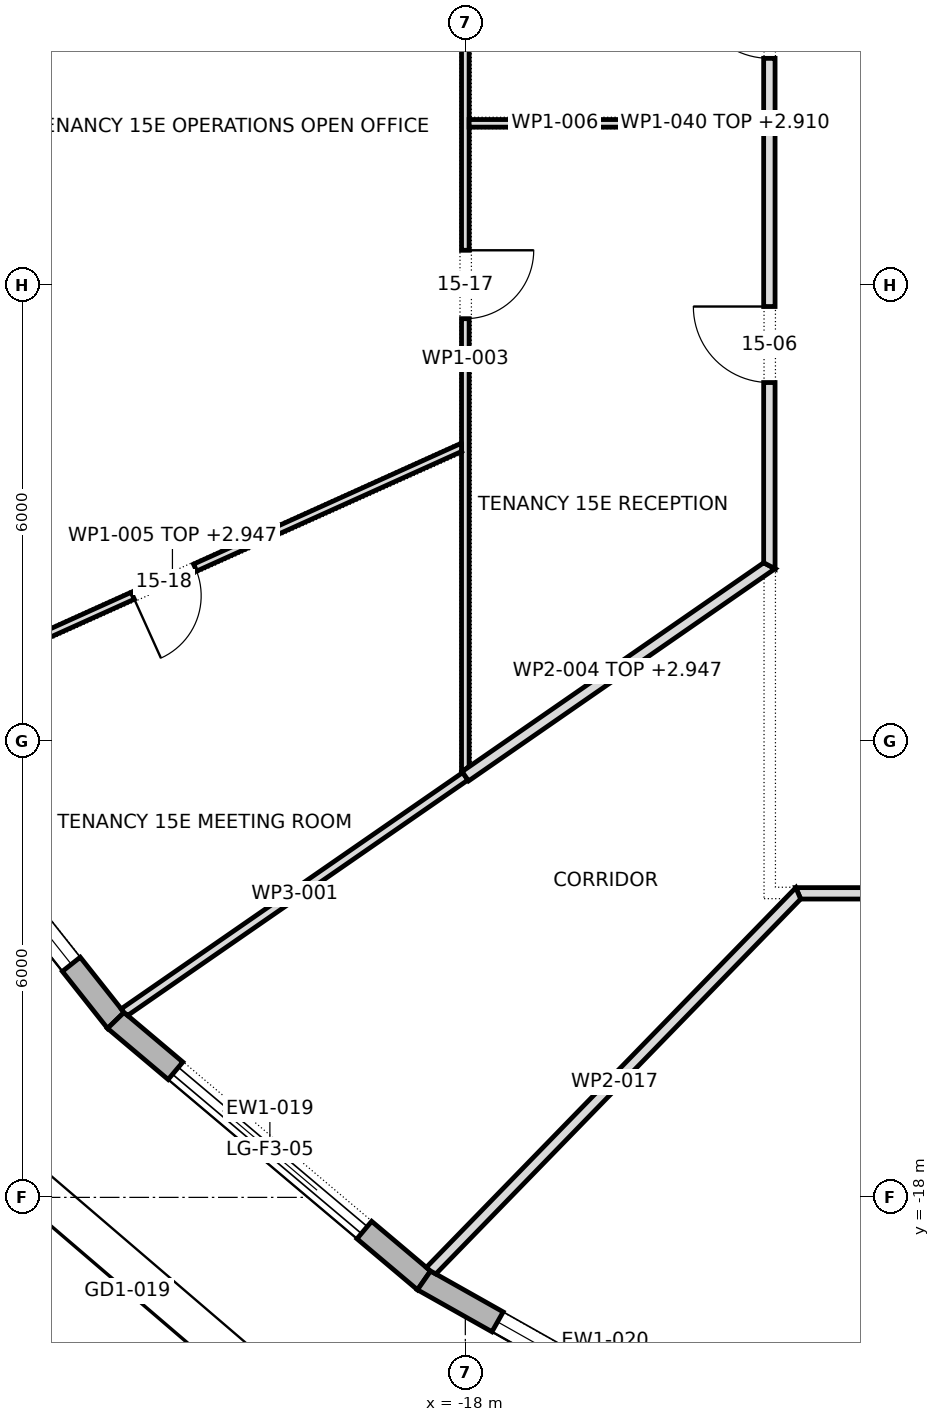
"""IFC4 building model, lengths in metres.
Left out: names, types, materials, properties, quantities, classifications, styles, units other than length and angle.
Written with IfcOpenShell. Run it as: python <this file> out.ifc"""

import sys

from ifc_helpers import new_model, si_unit, direction, frame, frame_2d, origin, place, context, subcontext, project, spatial, polyline, rectangle, outline, extrude, element, fill, save


model = new_model("IFC4")
c1 = context("Model", 3, precision=1e-05, world=origin(), true_north=direction((0.0, 1.0)))
c2 = subcontext(c1, "Body", "Model", "MODEL_VIEW")
j1 = project(units=[si_unit("LENGTHUNIT", "METRE"), si_unit("PLANEANGLEUNIT", "RADIAN")], contexts=[c1])
p1 = place(None, origin())
s1 = spatial("IfcSite", under=j1, at=p1, CompositionType="ELEMENT")
p2 = place(p1, origin())
s2 = spatial("IfcBuilding", under=s1, at=p2, CompositionType="ELEMENT")
p3 = place(p2, frame((0.0, 0.0, 214.9)))
s3 = spatial("IfcBuildingStorey", under=s2, at=p3, CompositionType="ELEMENT", Elevation=214.9)
p4 = place(p3, frame((-25.787, -11.648, 0.0), z_axis=(0.0, 0.0, 1.0), x_axis=(0.621017151557, -0.783796974651, 0.0)))
e1 = element("IfcWall", 1, at=p4, inside=s3, PredefinedType="STANDARD", context=c2, shape_type="SweptSolid", body=[
    extrude(outline(polyline([(-0.016, -0.15), (5.149, -0.15), (5.119, 0.15), (0.016, 0.15), (-0.016, -0.15)])), origin(), (0.0, 0.0, 1.0), 3.7),
])
p5 = place(p4, frame((0.942, 0.0, 0.6)))
e2 = element("IfcOpeningElement", 2, at=p5, cuts=e1, PredefinedType="OPENING", context=c2, shape_type="SweptSolid", body=[
    extrude(rectangle(XDim=3.25, YDim=2.65, at=frame_2d((1.625, 1.325))), frame((0.0, 0.162, 0.0), z_axis=(0.0, -1.0, 0.0), x_axis=(1.0, 0.0, 0.0)), (0.0, 0.0, 1.0), 0.324),
])
p6 = place(p3, frame((-22.599, -15.672, 0.0), z_axis=(0.0, 0.0, 1.0), x_axis=(0.764397795062, -0.644744919255, 0.0)))
e3 = element("IfcWall", 3, at=p6, inside=s3, PredefinedType="STANDARD", context=c2, shape_type="SweptSolid", body=[
    extrude(outline(polyline([(-0.015, -0.15), (5.319, -0.15), (5.291, 0.15), (0.015, 0.15), (-0.015, -0.15)])), origin(), (0.0, 0.0, 1.0), 3.7),
])
p7 = place(p6, frame((1.028, 0.0, 0.0)))
e4 = element("IfcOpeningElement", 4, at=p7, cuts=e3, PredefinedType="OPENING", context=c2, shape_type="SweptSolid", body=[
    extrude(rectangle(XDim=3.25, YDim=3.25, at=frame_2d((1.625, 1.625))), frame((0.0, 0.162, 0.0), z_axis=(0.0, -1.0, 0.0), x_axis=(1.0, 0.0, 0.0)), (0.0, 0.0, 1.0), 0.324),
])
p8 = place(p3, frame((-18.543, -19.092, 0.0), z_axis=(0.0, 0.0, 1.0), x_axis=(0.871207038577, -0.490915772749, 0.0)))
e5 = element("IfcWall", 5, at=p8, inside=s3, PredefinedType="STANDARD", context=c2, shape_type="SweptSolid", body=[
    extrude(outline(polyline([(-0.014, -0.15), (5.484, -0.15), (5.458, 0.15), (0.014, 0.15), (-0.014, -0.15)])), origin(), (0.0, 0.0, 1.0), 3.7),
])
p9 = place(p8, frame((1.111, 0.0, 0.6)))
e6 = element("IfcOpeningElement", 6, at=p9, cuts=e5, PredefinedType="OPENING", context=c2, shape_type="SweptSolid", body=[
    extrude(rectangle(XDim=3.25, YDim=2.65, at=frame_2d((1.625, 1.325))), frame((0.0, 0.162, 0.0), z_axis=(0.0, -1.0, 0.0), x_axis=(1.0, 0.0, 0.0)), (0.0, 0.0, 1.0), 0.324),
])
p10 = place(p3, frame((-22.493, -15.569, 0.0), z_axis=(0.0, 0.0, 1.0), x_axis=(0.822322462014, 0.569021764494, 0.0)))
e7 = element("IfcWall", 7, at=p10, inside=s3, PredefinedType="PARTITIONING", context=c2, shape_type="SweptSolid", body=[
    extrude(outline(polyline([(0.02, -0.06), (1.834, -0.06), (3.649, -0.06), (5.464, -0.06), (5.464, 0.06), (3.643, 0.06), (1.821, 0.06), (0.0, 0.06), (0.0, 0.053), (0.003, 0.0), (0.02, -0.06)])), origin(), (0.0, 0.0, 1.0), 3.7),
])
p11 = place(p3, frame((-18.0, -12.421, 0.0), z_axis=(0.0, 0.0, 1.0), x_axis=(0.0, 1.0, 0.0)))
e8 = element("IfcWall", 8, at=p11, inside=s3, PredefinedType="PARTITIONING", context=c2, shape_type="SweptSolid", body=[
    extrude(outline(polyline([(0.087, -0.05), (1.77, -0.05), (3.453, -0.05), (5.136, -0.05), (6.819, -0.05), (8.501, -0.05), (8.501, -0.05), (8.601, -0.05), (8.601, -0.05), (10.842, -0.05), (10.842, 0.046), (10.842, 0.05), (9.191, 0.05), (7.541, 0.05), (5.89, 0.05), (4.24, 0.05), (4.235, 0.048), (4.234, 0.05), (2.823, 0.05), (1.411, 0.05), (0.0, 0.05), (0.0, 0.05), (0.011, 0.034), (0.023, 0.043), (0.087, -0.05)])), origin(), (0.0, 0.0, 1.0), 3.7),
])
p12 = place(p11, frame((5.981, 0.0, 0.0)))
e9 = element("IfcOpeningElement", 9, at=p12, cuts=e8, PredefinedType="OPENING", context=c2, shape_type="SweptSolid", body=[
    extrude(rectangle(XDim=0.9, YDim=2.1, at=frame_2d((0.45, 1.05))), frame((0.0, 0.062, 0.0), z_axis=(0.0, -1.0, 0.0), x_axis=(1.0, 0.0, 0.0)), (0.0, 0.0, 1.0), 0.124),
])
p13 = place(p3, frame((-18.0, -12.46, 0.0), z_axis=(0.0, 0.0, 1.0), x_axis=(0.822102584422, 0.56933938972, 0.0)))
e10 = element("IfcWall", 10, at=p13, inside=s3, PredefinedType="PARTITIONING", context=c2, shape_type="SweptSolid", body=[
    extrude(outline(polyline([(0.0, -0.075), (1.635, -0.075), (3.27, -0.075), (4.905, -0.075), (4.826, 0.075), (3.217, 0.075), (1.609, 0.075), (0.0, 0.075), (0.0, -0.075)])), origin(), (0.0, 0.0, 1.0), 2.947),
])
p14 = place(p3, frame((-18.03, -8.123, 0.0), z_axis=(0.0, 0.0, 1.0), x_axis=(-0.911431984772, -0.411450771216, 0.0)))
e11 = element("IfcWall", 11, at=p14, inside=s3, PredefinedType="PARTITIONING", context=c2, shape_type="SweptSolid", body=[
    extrude(outline(polyline([(8.372, -0.05), (8.372, -0.042), (8.371, -0.0), (8.358, 0.05), (6.696, 0.05), (5.033, 0.05), (3.37, 0.05), (1.708, 0.05), (0.045, 0.05), (0.0, -0.05), (0.0, -0.05), (1.675, -0.05), (3.349, -0.05), (5.023, -0.05), (6.698, -0.05), (8.372, -0.05)])), origin(), (0.0, 0.0, 1.0), 2.947),
])
p15 = place(p14, frame((3.868, 0.0, 0.0)))
e12 = element("IfcOpeningElement", 12, at=p15, cuts=e11, PredefinedType="OPENING", context=c2, shape_type="SweptSolid", body=[
    extrude(rectangle(XDim=0.9, YDim=2.1, at=frame_2d((0.45, 1.05))), frame((0.0, 0.062, 0.0), z_axis=(0.0, -1.0, 0.0), x_axis=(1.0, 0.0, 0.0)), (0.0, 0.0, 1.0), 0.124),
])
p16 = place(p3, frame((-17.95, -3.87, 0.0), z_axis=(0.0, 0.0, 1.0), x_axis=(1.0, 0.0, 0.0)))
e13 = element("IfcWall", 13, at=p16, inside=s3, PredefinedType="PARTITIONING", context=c2, shape_type="SweptSolid", body=[
    extrude(rectangle(XDim=2.258, YDim=0.1, at=frame_2d((1.129, 0.0))), origin(), (0.0, 0.0, 1.0), 3.7),
])
p17 = place(p3, frame((-13.652, -14.0, 0.0), z_axis=(0.0, 0.0, 1.0), x_axis=(1.0, 0.0, 0.0)))
e14 = element("IfcWall", 14, at=p17, inside=s3, PredefinedType="PARTITIONING", context=c2, shape_type="SweptSolid", body=[
    extrude(outline(polyline([(0.063, -0.075), (2.004, -0.075), (3.946, -0.075), (5.887, -0.075), (7.828, -0.075), (9.769, -0.075), (11.71, -0.075), (13.652, -0.075), (15.593, -0.075), (17.534, -0.075), (19.475, -0.075), (21.417, -0.075), (23.358, -0.075), (25.299, -0.075), (27.24, -0.075), (27.303, 0.075), (27.303, 0.075), (25.353, 0.075), (23.403, 0.075), (21.453, 0.075), (19.502, 0.075), (17.552, 0.075), (15.602, 0.075), (13.652, 0.075), (11.701, 0.075), (9.751, 0.075), (7.801, 0.075), (5.851, 0.075), (3.9, 0.075), (1.95, 0.075), (0.0, 0.075), (0.0, 0.075), (0.063, -0.075)])), origin(), (0.0, 0.0, 1.0), 3.7),
])
p18 = place(p17, frame((5.527, 0.0, 0.0)))
e15 = element("IfcOpeningElement", 15, at=p18, cuts=e14, PredefinedType="OPENING", context=c2, shape_type="SweptSolid", body=[
    extrude(rectangle(XDim=1.0, YDim=2.1, at=frame_2d((0.5, 1.05))), frame((0.0, 0.087, 0.0), z_axis=(0.0, -1.0, 0.0), x_axis=(1.0, 0.0, 0.0)), (0.0, 0.0, 1.0), 0.174),
])
p19 = place(p17, frame((14.857, 0.0, 0.0)))
e16 = element("IfcOpeningElement", 16, at=p19, cuts=e14, PredefinedType="OPENING", context=c2, shape_type="SweptSolid", body=[
    extrude(rectangle(XDim=1.0, YDim=2.1, at=frame_2d((0.5, 1.05))), frame((0.0, 0.087, 0.0), z_axis=(0.0, -1.0, 0.0), x_axis=(1.0, 0.0, 0.0)), (0.0, 0.0, 1.0), 0.174),
])
p20 = place(p17, frame((22.482, 0.0, 0.0)))
e17 = element("IfcOpeningElement", 17, at=p20, cuts=e14, PredefinedType="OPENING", context=c2, shape_type="SweptSolid", body=[
    extrude(rectangle(XDim=1.0, YDim=2.1, at=frame_2d((0.5, 1.05))), frame((0.0, 0.087, 0.0), z_axis=(0.0, -1.0, 0.0), x_axis=(1.0, 0.0, 0.0)), (0.0, 0.0, 1.0), 0.174),
])
p21 = place(p3, frame((-14.0, -9.729, 0.0), z_axis=(0.0, 0.0, 1.0), x_axis=(0.0, 1.0, 0.0)))
e18 = element("IfcWall", 18, at=p21, inside=s3, PredefinedType="PARTITIONING", context=c2, shape_type="SweptSolid", body=[
    extrude(outline(polyline([(15.589, 0.075), (13.65, 0.075), (11.712, 0.075), (9.773, 0.075), (7.834, 0.075), (5.895, 0.075), (3.956, 0.075), (2.017, 0.075), (0.079, 0.075), (0.0, -0.075), (0.0, -0.075), (1.949, -0.075), (3.897, -0.075), (5.846, -0.075), (7.795, -0.075), (9.743, -0.075), (11.692, -0.075), (13.641, -0.075), (15.589, -0.075), (15.589, 0.075)])), origin(), (0.0, 0.0, 1.0), 3.7),
])
p22 = place(p21, frame((11.579, 0.0, 0.0)))
e19 = element("IfcOpeningElement", 19, at=p22, cuts=e18, PredefinedType="OPENING", context=c2, shape_type="SweptSolid", body=[
    extrude(rectangle(XDim=1.0, YDim=2.1, at=frame_2d((0.5, 1.05))), frame((0.0, 0.087, 0.0), z_axis=(0.0, -1.0, 0.0), x_axis=(1.0, 0.0, 0.0)), (0.0, 0.0, 1.0), 0.174),
])
p23 = place(p21, frame((2.449, 0.0, 0.0)))
e20 = element("IfcOpeningElement", 20, at=p23, cuts=e18, PredefinedType="OPENING", context=c2, shape_type="SweptSolid", body=[
    extrude(rectangle(XDim=1.0, YDim=2.1, at=frame_2d((0.5, 1.05))), frame((0.0, 0.087, 0.0), z_axis=(0.0, -1.0, 0.0), x_axis=(1.0, 0.0, 0.0)), (0.0, 0.0, 1.0), 0.174),
])
p24 = place(p21, frame((6.714, 0.0, 0.0)))
e21 = element("IfcOpeningElement", 21, at=p24, cuts=e18, PredefinedType="OPENING", context=c2, shape_type="SweptSolid", body=[
    extrude(rectangle(XDim=1.0, YDim=2.1, at=frame_2d((0.5, 1.05))), frame((0.0, 0.087, 0.0), z_axis=(0.0, -1.0, 0.0), x_axis=(1.0, 0.0, 0.0)), (0.0, 0.0, 1.0), 0.174),
])
p25 = place(p3, frame((-13.598, -13.977, 0.0), z_axis=(0.0, 0.0, 1.0), x_axis=(-0.697374409368, -0.716707006494, 0.0)))
e22 = element("IfcWall", 22, at=p25, inside=s3, PredefinedType="PARTITIONING", context=c2, shape_type="SweptSolid", body=[
    extrude(outline(polyline([(6.971, -0.075), (6.971, -0.07), (6.966, -0.002), (6.946, 0.075), (5.225, 0.075), (3.505, 0.075), (1.784, 0.075), (0.063, 0.075), (0.032, 0.0), (0.0, -0.075), (1.743, -0.075), (3.486, -0.075), (5.228, -0.075), (6.971, -0.075)])), origin(), (0.0, 0.0, 1.0), 3.7),
])
p26 = place(p3, frame((-15.692, -3.87, 0.0), z_axis=(0.0, 0.0, 1.0), x_axis=(1.0, 0.0, 0.0)))
e23 = element("IfcWall", 23, at=p26, inside=s3, PredefinedType="PARTITIONING", context=c2, shape_type="SweptSolid", body=[
    extrude(rectangle(XDim=1.617, YDim=0.1, at=frame_2d((0.809, 0.0))), origin(), (0.0, 0.0, 1.0), 2.91),
])
p27 = place(p5, origin())
e24 = element("IfcWindow", 24, at=p27, inside=s3, PartitioningType="TRIPLE_PANEL_VERTICAL", PredefinedType="WINDOW", context=c2, shape_type="SweptSolid", body=[
    extrude(rectangle(XDim=3.25, YDim=2.65, at=frame_2d((1.625, 1.325))), frame((0.0, 0.03, 0.0), z_axis=(0.0, -1.0, 0.0), x_axis=(1.0, 0.0, 0.0)), (0.0, 0.0, 1.0), 0.06),
])
fill(e2, e24)
p28 = place(p7, origin())
e25 = element("IfcDoor", 25, at=p28, inside=s3, OperationType="DOUBLE_DOOR_SLIDING", PredefinedType="DOOR", context=c2, shape_type="SweptSolid", body=[
    extrude(rectangle(XDim=3.25, YDim=3.25, at=frame_2d((1.625, 1.625))), frame((0.0, 0.025, 0.0), z_axis=(0.0, -1.0, 0.0), x_axis=(1.0, 0.0, 0.0)), (0.0, 0.0, 1.0), 0.05),
])
fill(e4, e25)
p29 = place(p9, origin())
e26 = element("IfcWindow", 26, at=p29, inside=s3, PartitioningType="TRIPLE_PANEL_VERTICAL", PredefinedType="WINDOW", context=c2, shape_type="SweptSolid", body=[
    extrude(rectangle(XDim=3.25, YDim=2.65, at=frame_2d((1.625, 1.325))), frame((0.0, 0.03, 0.0), z_axis=(0.0, -1.0, 0.0), x_axis=(1.0, 0.0, 0.0)), (0.0, 0.0, 1.0), 0.06),
])
fill(e6, e26)
p30 = place(p23, origin())
e27 = element("IfcDoor", 27, at=p30, inside=s3, OperationType="SINGLE_SWING_LEFT", PredefinedType="DOOR", context=c2, shape_type="SweptSolid", body=[
    extrude(rectangle(XDim=1.0, YDim=2.1, at=frame_2d((0.5, 1.05))), frame((0.0, 0.025, 0.0), z_axis=(0.0, -1.0, 0.0), x_axis=(1.0, 0.0, 0.0)), (0.0, 0.0, 1.0), 0.05),
])
fill(e20, e27)
p31 = place(p24, origin())
e28 = element("IfcDoor", 28, at=p31, inside=s3, OperationType="SINGLE_SWING_LEFT", PredefinedType="DOOR", context=c2, shape_type="SweptSolid", body=[
    extrude(rectangle(XDim=1.0, YDim=2.1, at=frame_2d((0.5, 1.05))), frame((0.0, 0.025, 0.0), z_axis=(0.0, -1.0, 0.0), x_axis=(1.0, 0.0, 0.0)), (0.0, 0.0, 1.0), 0.05),
])
fill(e21, e28)
p32 = place(p12, frame((0.9, 0.0, 0.0), z_axis=(0.0, 0.0, 1.0), x_axis=(-1.0, 0.0, 0.0)))
e29 = element("IfcDoor", 29, at=p32, inside=s3, OperationType="SINGLE_SWING_RIGHT", PredefinedType="DOOR", context=c2, shape_type="SweptSolid", body=[
    extrude(rectangle(XDim=0.9, YDim=2.1, at=frame_2d((0.45, 1.05))), frame((0.0, 0.025, 0.0), z_axis=(0.0, -1.0, 0.0), x_axis=(1.0, 0.0, 0.0)), (0.0, 0.0, 1.0), 0.05),
])
fill(e9, e29)
p33 = place(p15, origin())
e30 = element("IfcDoor", 30, at=p33, inside=s3, OperationType="SINGLE_SWING_LEFT", PredefinedType="DOOR", context=c2, shape_type="SweptSolid", body=[
    extrude(rectangle(XDim=0.9, YDim=2.1, at=frame_2d((0.45, 1.05))), frame((0.0, 0.025, 0.0), z_axis=(0.0, -1.0, 0.0), x_axis=(1.0, 0.0, 0.0)), (0.0, 0.0, 1.0), 0.05),
])
fill(e12, e30)
save(model, sys.argv[1])
